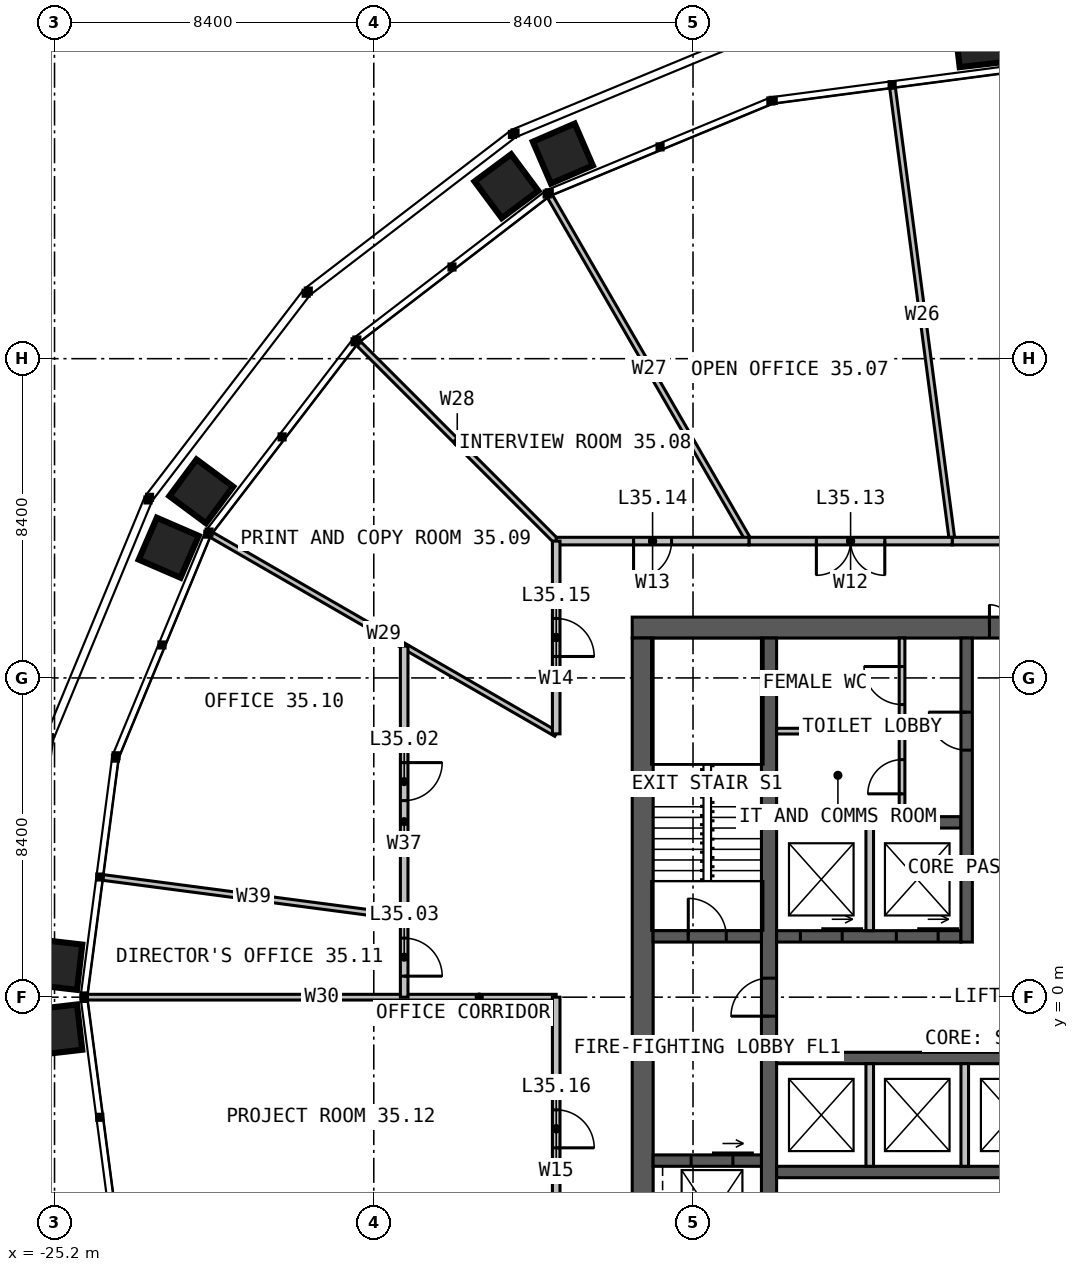
"""IFC4 building model, lengths in metres.
Left out: names, types, materials, properties, quantities, classifications, styles, units other than length and angle.
Written with IfcOpenShell. Run it as: python <this file> out.ifc"""

import sys

from ifc_helpers import new_model, si_unit, direction, frame, frame_2d, origin, place, context, subcontext, project, spatial, rectangle, extrude, element, fill, save


model = new_model("IFC4")
c1 = context("Model", 3, precision=1e-05, world=origin(), true_north=direction((0.0, 1.0)))
c2 = subcontext(c1, "Body", "Model", "MODEL_VIEW")
j1 = project(units=[si_unit("LENGTHUNIT", "METRE"), si_unit("PLANEANGLEUNIT", "RADIAN")], contexts=[c1])
p1 = place(None, origin())
s1 = spatial("IfcSite", under=j1, at=p1, CompositionType="ELEMENT")
p2 = place(p1, origin())
s2 = spatial("IfcBuilding", under=s1, at=p2, CompositionType="ELEMENT")
p3 = place(p2, frame((0.0, 0.0, 146.0)))
s3 = spatial("IfcBuildingStorey", under=s2, at=p3, CompositionType="ELEMENT", Elevation=146.0)
p4 = place(p3, frame((-10.0, 9.725, 0.0), z_axis=(0.0, 0.0, 1.0), x_axis=(1.0, 0.0, 0.0)))
e1 = element("IfcWall", 1, at=p4, inside=s3, PredefinedType="SOLIDWALL", context=c2, shape_type="SweptSolid", body=[
    extrude(rectangle(XDim=20.0, YDim=0.55, at=frame_2d((10.0, 0.0))), origin(), (0.0, 0.0, 1.0), 4.0),
])
p5 = place(p4, frame((9.4, 0.0, 0.0)))
e2 = element("IfcOpeningElement", 2, at=p5, cuts=e1, PredefinedType="OPENING", context=c2, shape_type="SweptSolid", body=[
    extrude(rectangle(XDim=1.2, YDim=2.2, at=frame_2d((0.6, 1.1))), frame((0.0, 0.285, 0.0), z_axis=(0.0, -1.0, 0.0), x_axis=(1.0, 0.0, 0.0)), (0.0, 0.0, 1.0), 0.57),
])
p6 = place(p3, frame((-9.725, 9.45, 0.0), z_axis=(0.0, 0.0, 1.0), x_axis=(0.0, -1.0, 0.0)))
e3 = element("IfcWall", 3, at=p6, inside=s3, PredefinedType="SOLIDWALL", context=c2, shape_type="SweptSolid", body=[
    extrude(rectangle(XDim=18.9, YDim=0.55, at=frame_2d((9.45, 0.0))), origin(), (0.0, 0.0, 1.0), 4.0),
])
p7 = place(p3, frame((-6.4, -9.45, 0.0), z_axis=(0.0, 0.0, 1.0), x_axis=(0.0, 1.0, 0.0)))
e4 = element("IfcWall", 4, at=p7, inside=s3, PredefinedType="SOLIDWALL", context=c2, shape_type="SweptSolid", body=[
    extrude(rectangle(XDim=18.9, YDim=0.4, at=frame_2d((9.45, 0.0))), origin(), (0.0, 0.0, 1.0), 4.0),
])
p8 = place(p7, frame((8.95, 0.0, 0.0)))
e5 = element("IfcOpeningElement", 5, at=p8, cuts=e4, PredefinedType="OPENING", context=c2, shape_type="SweptSolid", body=[
    extrude(rectangle(XDim=1.0, YDim=2.2, at=frame_2d((0.5, 1.1))), frame((0.0, 0.21, 0.0), z_axis=(0.0, -1.0, 0.0), x_axis=(1.0, 0.0, 0.0)), (0.0, 0.0, 1.0), 0.42),
])
p9 = place(p3, frame((-6.2, 1.6, 0.0), z_axis=(0.0, 0.0, 1.0), x_axis=(1.0, 0.0, 0.0)))
e6 = element("IfcWall", 6, at=p9, inside=s3, PredefinedType="SOLIDWALL", context=c2, shape_type="SweptSolid", body=[
    extrude(rectangle(XDim=4.85, YDim=0.3, at=frame_2d((2.425, 0.0))), origin(), (0.0, 0.0, 1.0), 4.0),
])
p10 = place(p9, frame((0.625, 0.0, 0.0)))
e7 = element("IfcOpeningElement", 7, at=p10, cuts=e6, PredefinedType="OPENING", context=c2, shape_type="SweptSolid", body=[
    extrude(rectangle(XDim=1.1, YDim=2.2, at=frame_2d((0.55, 1.1))), frame((0.0, 0.16, 0.0), z_axis=(0.0, -1.0, 0.0), x_axis=(1.0, 0.0, 0.0)), (0.0, 0.0, 1.0), 0.32),
])
p11 = place(p9, frame((3.15, 0.0, 0.0)))
e8 = element("IfcOpeningElement", 8, at=p11, cuts=e6, PredefinedType="OPENING", context=c2, shape_type="SweptSolid", body=[
    extrude(rectangle(XDim=1.1, YDim=2.2, at=frame_2d((0.55, 1.1))), frame((0.0, 0.16, 0.0), z_axis=(0.0, -1.0, 0.0), x_axis=(1.0, 0.0, 0.0)), (0.0, 0.0, 1.0), 0.32),
])
p12 = place(p3, frame((-6.2, 4.6, 0.0), z_axis=(0.0, 0.0, 1.0), x_axis=(1.0, 0.0, 0.0)))
e9 = element("IfcWall", 9, at=p12, inside=s3, PredefinedType="SOLIDWALL", context=c2, shape_type="SweptSolid", body=[
    extrude(rectangle(XDim=4.85, YDim=0.3, at=frame_2d((2.425, 0.0))), origin(), (0.0, 0.0, 1.0), 4.0),
])
p13 = place(p3, frame((-1.2, 1.45, 0.0), z_axis=(0.0, 0.0, 1.0), x_axis=(0.0, 1.0, 0.0)))
e10 = element("IfcWall", 10, at=p13, inside=s3, PredefinedType="SOLIDWALL", context=c2, shape_type="SweptSolid", body=[
    extrude(rectangle(XDim=8.0, YDim=0.3, at=frame_2d((4.0, 0.0))), origin(), (0.0, 0.0, 1.0), 4.0),
])
p14 = place(p13, frame((5.05, 0.0, 0.0)))
e11 = element("IfcOpeningElement", 11, at=p14, cuts=e10, PredefinedType="OPENING", context=c2, shape_type="SweptSolid", body=[
    extrude(rectangle(XDim=1.0, YDim=2.2, at=frame_2d((0.5, 1.1))), frame((0.0, 0.16, 0.0), z_axis=(0.0, -1.0, 0.0), x_axis=(1.0, 0.0, 0.0)), (0.0, 0.0, 1.0), 0.32),
])
for number, where, z_axis, x_axis in (
    (12, (-6.2, -1.6, 0.0), (0.0, 0.0, 1.0), (1.0, 0.0, 0.0)),
    (13, (-6.2, -4.6, 0.0), (0.0, 0.0, 1.0), (1.0, 0.0, 0.0)),
):
    element("IfcWall", number, at=place(p3, frame(where, z_axis=z_axis, x_axis=x_axis)), inside=s3, PredefinedType="SOLIDWALL", context=c2, shape_type="SweptSolid", body=[
        extrude(rectangle(XDim=7.4, YDim=0.3, at=frame_2d((3.7, 0.0))), origin(), (0.0, 0.0, 1.0), 4.0),
    ])
p15 = place(p3, frame((-9.45, 1.6, 0.0), z_axis=(0.0, 0.0, 1.0), x_axis=(1.0, 0.0, 0.0)))
e14 = element("IfcWall", 14, at=p15, inside=s3, PredefinedType="SOLIDWALL", context=c2, shape_type="SweptSolid", body=[
    extrude(rectangle(XDim=2.85, YDim=0.3, at=frame_2d((1.425, 0.0))), origin(), (0.0, 0.0, 1.0), 4.0),
])
p16 = place(p15, frame((0.925, 0.0, 0.0)))
e15 = element("IfcOpeningElement", 15, at=p16, cuts=e14, PredefinedType="OPENING", context=c2, shape_type="SweptSolid", body=[
    extrude(rectangle(XDim=1.0, YDim=2.2, at=frame_2d((0.5, 1.1))), frame((0.0, 0.16, 0.0), z_axis=(0.0, -1.0, 0.0), x_axis=(1.0, 0.0, 0.0)), (0.0, 0.0, 1.0), 0.32),
])
p17 = place(p3, frame((-9.45, -4.3, 0.0), z_axis=(0.0, 0.0, 1.0), x_axis=(1.0, 0.0, 0.0)))
e16 = element("IfcWall", 16, at=p17, inside=s3, PredefinedType="SOLIDWALL", context=c2, shape_type="SweptSolid", body=[
    extrude(rectangle(XDim=2.85, YDim=0.3, at=frame_2d((1.425, 0.0))), origin(), (0.0, 0.0, 1.0), 4.0),
])
p18 = place(p17, frame((1.0, 0.0, 0.0)))
e17 = element("IfcOpeningElement", 17, at=p18, cuts=e16, PredefinedType="OPENING", context=c2, shape_type="SweptSolid", body=[
    extrude(rectangle(XDim=1.1, YDim=2.2, at=frame_2d((0.55, 1.1))), frame((0.0, 0.16, 0.0), z_axis=(0.0, -1.0, 0.0), x_axis=(1.0, 0.0, 0.0)), (0.0, 0.0, 1.0), 0.32),
])
for number, where, z_axis, x_axis in (
    (18, (-3.75, 1.75, 0.0), (0.0, 0.0, 1.0), (0.0, 1.0, 0.0)),
    (19, (-3.75, -1.75, 0.0), (0.0, 0.0, 1.0), (0.0, -1.0, 0.0)),
    (20, (-1.25, -1.75, 0.0), (0.0, 0.0, 1.0), (0.0, -1.0, 0.0)),
):
    element("IfcWall", number, at=place(p3, frame(where, z_axis=z_axis, x_axis=x_axis)), inside=s3, PredefinedType="SOLIDWALL", context=c2, shape_type="SweptSolid", body=[
        extrude(rectangle(XDim=2.7, YDim=0.2, at=frame_2d((1.35, 0.0))), origin(), (0.0, 0.0, 1.0), 3.75),
    ])
p19 = place(p3, frame((-2.9, 4.75, 0.0), z_axis=(0.0, 0.0, 1.0), x_axis=(0.0, 1.0, 0.0)))
e21 = element("IfcWall", 21, at=p19, inside=s3, PredefinedType="PARTITIONING", context=c2, shape_type="SweptSolid", body=[
    extrude(rectangle(XDim=4.7, YDim=0.15, at=frame_2d((2.35, 0.0))), origin(), (0.0, 0.0, 1.0), 3.75),
])
p20 = place(p19, frame((2.95, 0.0, 0.0)))
e22 = element("IfcOpeningElement", 22, at=p20, cuts=e21, PredefinedType="OPENING", context=c2, shape_type="SweptSolid", body=[
    extrude(rectangle(XDim=1.0, YDim=2.2, at=frame_2d((0.5, 1.1))), frame((0.0, 0.085, 0.0), z_axis=(0.0, -1.0, 0.0), x_axis=(1.0, 0.0, 0.0)), (0.0, 0.0, 1.0), 0.17),
])
p21 = place(p19, frame((0.6, 0.0, 0.0)))
e23 = element("IfcOpeningElement", 23, at=p21, cuts=e21, PredefinedType="OPENING", context=c2, shape_type="SweptSolid", body=[
    extrude(rectangle(XDim=0.9, YDim=2.2, at=frame_2d((0.45, 1.1))), frame((0.0, 0.085, 0.0), z_axis=(0.0, -1.0, 0.0), x_axis=(1.0, 0.0, 0.0)), (0.0, 0.0, 1.0), 0.17),
])
p22 = place(p3, frame((-6.2, 7.0, 0.0), z_axis=(0.0, 0.0, 1.0), x_axis=(1.0, 0.0, 0.0)))
e24 = element("IfcWall", 24, at=p22, inside=s3, PredefinedType="PARTITIONING", context=c2, shape_type="SweptSolid", body=[
    extrude(rectangle(XDim=3.225, YDim=0.15, at=frame_2d((1.612, 0.0))), origin(), (0.0, 0.0, 1.0), 3.75),
])
p23 = place(p3, frame((-1.58, 12.0, 0.0), z_axis=(0.0, 0.0, 1.0), x_axis=(-0.130532781527, 0.991443993853, 0.0)))
e25 = element("IfcWall", 25, at=p23, inside=s3, PredefinedType="PARTITIONING", context=c2, shape_type="SweptSolid", body=[
    extrude(rectangle(XDim=12.022, YDim=0.15, at=frame_2d((6.011, 0.0))), origin(), (0.0, 0.0, 1.0), 2.79),
])
p24 = place(p3, frame((-6.928, 12.0, 0.0), z_axis=(0.0, 0.0, 1.0), x_axis=(-0.49999340367, 0.866029212144, 0.0)))
e26 = element("IfcWall", 26, at=p24, inside=s3, PredefinedType="PARTITIONING", context=c2, shape_type="SweptSolid", body=[
    extrude(rectangle(XDim=10.478, YDim=0.15, at=frame_2d((5.239, 0.0))), origin(), (0.0, 0.0, 1.0), 2.79),
])
p25 = place(p3, frame((-12.0, 12.0, 0.0), z_axis=(0.0, 0.0, 1.0), x_axis=(-0.707106781187, 0.707106781187, 0.0)))
e27 = element("IfcWall", 27, at=p25, inside=s3, PredefinedType="PARTITIONING", context=c2, shape_type="SweptSolid", body=[
    extrude(rectangle(XDim=7.364, YDim=0.15, at=frame_2d((3.682, 0.0))), origin(), (0.0, 0.0, 1.0), 2.79),
])
p26 = place(p3, frame((-12.0, 6.928, 0.0), z_axis=(0.0, 0.0, 1.0), x_axis=(-0.866029212144, 0.49999340367, 0.0)))
e28 = element("IfcWall", 28, at=p26, inside=s3, PredefinedType="PARTITIONING", context=c2, shape_type="SweptSolid", body=[
    extrude(rectangle(XDim=10.478, YDim=0.15, at=frame_2d((5.239, 0.0))), origin(), (0.0, 0.0, 1.0), 2.79),
])
p27 = place(p3, frame((-12.0, 0.0, 0.0), z_axis=(0.0, 0.0, 1.0), x_axis=(-1.0, 0.0, 0.0)))
e29 = element("IfcWall", 29, at=p27, inside=s3, PredefinedType="PARTITIONING", context=c2, shape_type="SweptSolid", body=[
    extrude(rectangle(XDim=12.334, YDim=0.15, at=frame_2d((6.167, 0.0))), origin(), (0.0, 0.0, 1.0), 2.79),
])
p28 = place(p3, frame((6.928, 12.0, 0.0), z_axis=(0.0, 0.0, 1.0), x_axis=(-1.0, 0.0, 0.0)))
e30 = element("IfcWall", 30, at=p28, inside=s3, PredefinedType="PARTITIONING", context=c2, shape_type="SweptSolid", body=[
    extrude(rectangle(XDim=8.508, YDim=0.2, at=frame_2d((4.254, 0.0))), origin(), (0.0, 0.0, 1.0), 3.8),
])
p29 = place(p28, frame((3.354, 0.0, 0.0)))
e31 = element("IfcOpeningElement", 31, at=p29, cuts=e30, PredefinedType="OPENING", context=c2, shape_type="SweptSolid", body=[
    extrude(rectangle(XDim=1.8, YDim=2.2, at=frame_2d((0.9, 1.1))), frame((0.0, 0.11, 0.0), z_axis=(0.0, -1.0, 0.0), x_axis=(1.0, 0.0, 0.0)), (0.0, 0.0, 1.0), 0.22),
])
p30 = place(p3, frame((-1.58, 12.0, 0.0), z_axis=(0.0, 0.0, 1.0), x_axis=(-1.0, 0.0, 0.0)))
e32 = element("IfcWall", 32, at=p30, inside=s3, PredefinedType="PARTITIONING", context=c2, shape_type="SweptSolid", body=[
    extrude(rectangle(XDim=5.348, YDim=0.2, at=frame_2d((2.674, 0.0))), origin(), (0.0, 0.0, 1.0), 3.8),
])
p31 = place(p30, frame((1.774, 0.0, 0.0)))
e33 = element("IfcOpeningElement", 33, at=p31, cuts=e32, PredefinedType="OPENING", context=c2, shape_type="SweptSolid", body=[
    extrude(rectangle(XDim=1.8, YDim=2.2, at=frame_2d((0.9, 1.1))), frame((0.0, 0.11, 0.0), z_axis=(0.0, -1.0, 0.0), x_axis=(1.0, 0.0, 0.0)), (0.0, 0.0, 1.0), 0.22),
])
p32 = place(p3, frame((-6.928, 12.0, 0.0), z_axis=(0.0, 0.0, 1.0), x_axis=(-1.0, 0.0, 0.0)))
e34 = element("IfcWall", 34, at=p32, inside=s3, PredefinedType="PARTITIONING", context=c2, shape_type="SweptSolid", body=[
    extrude(rectangle(XDim=5.072, YDim=0.2, at=frame_2d((2.536, 0.0))), origin(), (0.0, 0.0, 1.0), 3.8),
])
p33 = place(p32, frame((2.036, 0.0, 0.0)))
e35 = element("IfcOpeningElement", 35, at=p33, cuts=e34, PredefinedType="OPENING", context=c2, shape_type="SweptSolid", body=[
    extrude(rectangle(XDim=1.0, YDim=2.2, at=frame_2d((0.5, 1.1))), frame((0.0, 0.11, 0.0), z_axis=(0.0, -1.0, 0.0), x_axis=(1.0, 0.0, 0.0)), (0.0, 0.0, 1.0), 0.22),
])
p34 = place(p3, frame((-12.0, 12.0, 0.0), z_axis=(0.0, 0.0, 1.0), x_axis=(0.0, -1.0, 0.0)))
e36 = element("IfcWall", 36, at=p34, inside=s3, PredefinedType="PARTITIONING", context=c2, shape_type="SweptSolid", body=[
    extrude(rectangle(XDim=5.072, YDim=0.2, at=frame_2d((2.536, 0.0))), origin(), (0.0, 0.0, 1.0), 3.8),
])
p35 = place(p34, frame((2.036, 0.0, 0.0)))
e37 = element("IfcOpeningElement", 37, at=p35, cuts=e36, PredefinedType="OPENING", context=c2, shape_type="SweptSolid", body=[
    extrude(rectangle(XDim=1.0, YDim=2.2, at=frame_2d((0.5, 1.1))), frame((0.0, 0.11, 0.0), z_axis=(0.0, -1.0, 0.0), x_axis=(1.0, 0.0, 0.0)), (0.0, 0.0, 1.0), 0.22),
])
p36 = place(p3, frame((-16.0, 9.238, 0.0), z_axis=(0.0, 0.0, 1.0), x_axis=(0.0, -1.0, 0.0)))
e38 = element("IfcWall", 38, at=p36, inside=s3, PredefinedType="PARTITIONING", context=c2, shape_type="SweptSolid", body=[
    extrude(rectangle(XDim=9.238, YDim=0.2, at=frame_2d((4.619, 0.0))), origin(), (0.0, 0.0, 1.0), 3.8),
])
p37 = place(p36, frame((3.066, 0.0, 0.0)))
e39 = element("IfcOpeningElement", 39, at=p37, cuts=e38, PredefinedType="OPENING", context=c2, shape_type="SweptSolid", body=[
    extrude(rectangle(XDim=1.0, YDim=2.2, at=frame_2d((0.5, 1.1))), frame((0.0, 0.11, 0.0), z_axis=(0.0, -1.0, 0.0), x_axis=(1.0, 0.0, 0.0)), (0.0, 0.0, 1.0), 0.22),
])
p38 = place(p36, frame((7.684, 0.0, 0.0)))
e40 = element("IfcOpeningElement", 40, at=p38, cuts=e38, PredefinedType="OPENING", context=c2, shape_type="SweptSolid", body=[
    extrude(rectangle(XDim=1.0, YDim=2.2, at=frame_2d((0.5, 1.1))), frame((0.0, 0.11, 0.0), z_axis=(0.0, -1.0, 0.0), x_axis=(1.0, 0.0, 0.0)), (0.0, 0.0, 1.0), 0.22),
])
p39 = place(p3, frame((-16.0, 2.106, 0.0), z_axis=(0.0, 0.0, 1.0), x_axis=(-0.991443577351, 0.13053594497, 0.0)))
e41 = element("IfcWall", 41, at=p39, inside=s3, PredefinedType="PARTITIONING", context=c2, shape_type="SweptSolid", body=[
    extrude(rectangle(XDim=7.988, YDim=0.15, at=frame_2d((3.994, 0.0))), origin(), (0.0, 0.0, 1.0), 2.79),
])
p40 = place(p3, frame((-12.0, 0.0, 0.0), z_axis=(0.0, 0.0, 1.0), x_axis=(0.0, -1.0, 0.0)))
e42 = element("IfcWall", 42, at=p40, inside=s3, PredefinedType="PARTITIONING", context=c2, shape_type="SweptSolid", body=[
    extrude(rectangle(XDim=6.928, YDim=0.2, at=frame_2d((3.464, 0.0))), origin(), (0.0, 0.0, 1.0), 3.8),
])
p41 = place(p40, frame((2.964, 0.0, 0.0)))
e43 = element("IfcOpeningElement", 43, at=p41, cuts=e42, PredefinedType="OPENING", context=c2, shape_type="SweptSolid", body=[
    extrude(rectangle(XDim=1.0, YDim=2.2, at=frame_2d((0.5, 1.1))), frame((0.0, 0.11, 0.0), z_axis=(0.0, -1.0, 0.0), x_axis=(1.0, 0.0, 0.0)), (0.0, 0.0, 1.0), 0.22),
])
p42 = place(p5, origin())
e44 = element("IfcDoor", 44, at=p42, inside=s3, OperationType="DOUBLE_DOOR_SINGLE_SWING", PredefinedType="DOOR", context=c2, shape_type="SweptSolid", body=[
    extrude(rectangle(XDim=1.2, YDim=2.2, at=frame_2d((0.6, 1.1))), frame((0.0, 0.025, 0.0), z_axis=(0.0, -1.0, 0.0), x_axis=(1.0, 0.0, 0.0)), (0.0, 0.0, 1.0), 0.05),
])
fill(e2, e44)
p43 = place(p8, origin())
e45 = element("IfcDoor", 45, at=p43, inside=s3, OperationType="SINGLE_SWING_LEFT", PredefinedType="DOOR", context=c2, shape_type="SweptSolid", body=[
    extrude(rectangle(XDim=1.0, YDim=2.2, at=frame_2d((0.5, 1.1))), frame((0.0, 0.025, 0.0), z_axis=(0.0, -1.0, 0.0), x_axis=(1.0, 0.0, 0.0)), (0.0, 0.0, 1.0), 0.05),
])
fill(e5, e45)
p44 = place(p16, origin())
e46 = element("IfcDoor", 46, at=p44, inside=s3, OperationType="SINGLE_SWING_LEFT", PredefinedType="DOOR", context=c2, shape_type="SweptSolid", body=[
    extrude(rectangle(XDim=1.0, YDim=2.2, at=frame_2d((0.5, 1.1))), frame((0.0, 0.025, 0.0), z_axis=(0.0, -1.0, 0.0), x_axis=(1.0, 0.0, 0.0)), (0.0, 0.0, 1.0), 0.05),
])
fill(e15, e46)
p45 = place(p14, origin())
e47 = element("IfcDoor", 47, at=p45, inside=s3, OperationType="SINGLE_SWING_RIGHT", PredefinedType="DOOR", context=c2, shape_type="SweptSolid", body=[
    extrude(rectangle(XDim=1.0, YDim=2.2, at=frame_2d((0.5, 1.1))), frame((0.0, 0.025, 0.0), z_axis=(0.0, -1.0, 0.0), x_axis=(1.0, 0.0, 0.0)), (0.0, 0.0, 1.0), 0.05),
])
fill(e11, e47)
p46 = place(p20, origin())
e48 = element("IfcDoor", 48, at=p46, inside=s3, OperationType="SINGLE_SWING_RIGHT", PredefinedType="DOOR", context=c2, shape_type="SweptSolid", body=[
    extrude(rectangle(XDim=1.0, YDim=2.2, at=frame_2d((0.5, 1.1))), frame((0.0, 0.025, 0.0), z_axis=(0.0, -1.0, 0.0), x_axis=(1.0, 0.0, 0.0)), (0.0, 0.0, 1.0), 0.05),
])
fill(e22, e48)
p47 = place(p21, origin())
e49 = element("IfcDoor", 49, at=p47, inside=s3, OperationType="SINGLE_SWING_LEFT", PredefinedType="DOOR", context=c2, shape_type="SweptSolid", body=[
    extrude(rectangle(XDim=0.9, YDim=2.2, at=frame_2d((0.45, 1.1))), frame((0.0, 0.025, 0.0), z_axis=(0.0, -1.0, 0.0), x_axis=(1.0, 0.0, 0.0)), (0.0, 0.0, 1.0), 0.05),
])
fill(e23, e49)
p48 = place(p10, origin())
e50 = element("IfcDoor", 50, at=p48, inside=s3, OperationType="SLIDING_TO_LEFT", PredefinedType="DOOR", context=c2, shape_type="SweptSolid", body=[
    extrude(rectangle(XDim=1.1, YDim=2.2, at=frame_2d((0.55, 1.1))), frame((0.0, 0.025, 0.0), z_axis=(0.0, -1.0, 0.0), x_axis=(1.0, 0.0, 0.0)), (0.0, 0.0, 1.0), 0.05),
])
fill(e7, e50)
p49 = place(p11, origin())
e51 = element("IfcDoor", 51, at=p49, inside=s3, OperationType="SLIDING_TO_LEFT", PredefinedType="DOOR", context=c2, shape_type="SweptSolid", body=[
    extrude(rectangle(XDim=1.1, YDim=2.2, at=frame_2d((0.55, 1.1))), frame((0.0, 0.025, 0.0), z_axis=(0.0, -1.0, 0.0), x_axis=(1.0, 0.0, 0.0)), (0.0, 0.0, 1.0), 0.05),
])
fill(e8, e51)
p50 = place(p18, origin())
e52 = element("IfcDoor", 52, at=p50, inside=s3, OperationType="SLIDING_TO_LEFT", PredefinedType="DOOR", context=c2, shape_type="SweptSolid", body=[
    extrude(rectangle(XDim=1.1, YDim=2.2, at=frame_2d((0.55, 1.1))), frame((0.0, 0.025, 0.0), z_axis=(0.0, -1.0, 0.0), x_axis=(1.0, 0.0, 0.0)), (0.0, 0.0, 1.0), 0.05),
])
fill(e17, e52)
p51 = place(p31, origin())
e53 = element("IfcDoor", 53, at=p51, inside=s3, OperationType="DOUBLE_DOOR_SINGLE_SWING", PredefinedType="DOOR", context=c2, shape_type="SweptSolid", body=[
    extrude(rectangle(XDim=1.8, YDim=2.2, at=frame_2d((0.9, 1.1))), frame((0.0, 0.025, 0.0), z_axis=(0.0, -1.0, 0.0), x_axis=(1.0, 0.0, 0.0)), (0.0, 0.0, 1.0), 0.05),
])
fill(e33, e53)
p52 = place(p33, origin())
e54 = element("IfcDoor", 54, at=p52, inside=s3, OperationType="SINGLE_SWING_RIGHT", PredefinedType="DOOR", context=c2, shape_type="SweptSolid", body=[
    extrude(rectangle(XDim=1.0, YDim=2.2, at=frame_2d((0.5, 1.1))), frame((0.0, 0.025, 0.0), z_axis=(0.0, -1.0, 0.0), x_axis=(1.0, 0.0, 0.0)), (0.0, 0.0, 1.0), 0.05),
])
fill(e35, e54)
p53 = place(p35, origin())
e55 = element("IfcDoor", 55, at=p53, inside=s3, OperationType="SINGLE_SWING_RIGHT", PredefinedType="DOOR", context=c2, shape_type="SweptSolid", body=[
    extrude(rectangle(XDim=1.0, YDim=2.2, at=frame_2d((0.5, 1.1))), frame((0.0, 0.025, 0.0), z_axis=(0.0, -1.0, 0.0), x_axis=(1.0, 0.0, 0.0)), (0.0, 0.0, 1.0), 0.05),
])
fill(e37, e55)
p54 = place(p37, origin())
e56 = element("IfcDoor", 56, at=p54, inside=s3, OperationType="SINGLE_SWING_LEFT", PredefinedType="DOOR", context=c2, shape_type="SweptSolid", body=[
    extrude(rectangle(XDim=1.0, YDim=2.2, at=frame_2d((0.5, 1.1))), frame((0.0, 0.025, 0.0), z_axis=(0.0, -1.0, 0.0), x_axis=(1.0, 0.0, 0.0)), (0.0, 0.0, 1.0), 0.05),
])
fill(e39, e56)
p55 = place(p38, origin())
e57 = element("IfcDoor", 57, at=p55, inside=s3, OperationType="SINGLE_SWING_RIGHT", PredefinedType="DOOR", context=c2, shape_type="SweptSolid", body=[
    extrude(rectangle(XDim=1.0, YDim=2.2, at=frame_2d((0.5, 1.1))), frame((0.0, 0.025, 0.0), z_axis=(0.0, -1.0, 0.0), x_axis=(1.0, 0.0, 0.0)), (0.0, 0.0, 1.0), 0.05),
])
fill(e40, e57)
p56 = place(p41, origin())
e58 = element("IfcDoor", 58, at=p56, inside=s3, OperationType="SINGLE_SWING_RIGHT", PredefinedType="DOOR", context=c2, shape_type="SweptSolid", body=[
    extrude(rectangle(XDim=1.0, YDim=2.2, at=frame_2d((0.5, 1.1))), frame((0.0, 0.025, 0.0), z_axis=(0.0, -1.0, 0.0), x_axis=(1.0, 0.0, 0.0)), (0.0, 0.0, 1.0), 0.05),
])
fill(e43, e58)
save(model, sys.argv[1])
